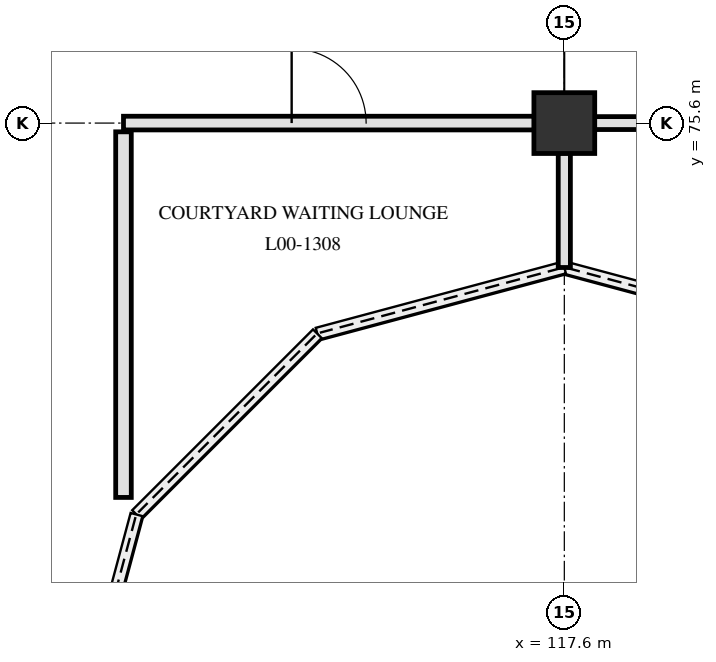
"""IFC4 building model, lengths in metres.
Left out: names, types, materials, properties, quantities, classifications, styles, units other than length and angle.
Written with IfcOpenShell. Run it as: python <this file> out.ifc"""

import sys

from ifc_helpers import new_model, si_unit, direction, frame, frame_2d, origin, origin_2d, place, context, subcontext, project, spatial, rectangle, circle, extrude, element, fill, save


model = new_model("IFC4")
c1 = context("Model", 3, precision=1e-05, world=origin(), true_north=direction((0.0, 1.0)))
c2 = subcontext(c1, "Body", "Model", "MODEL_VIEW")
j1 = project(units=[si_unit("LENGTHUNIT", "METRE"), si_unit("PLANEANGLEUNIT", "RADIAN")], contexts=[c1])
p1 = place(None, origin())
s1 = spatial("IfcSite", under=j1, at=p1, CompositionType="ELEMENT")
p2 = place(p1, origin())
s2 = spatial("IfcBuilding", under=s1, at=p2, CompositionType="ELEMENT")
p3 = place(p2, origin())
s3 = spatial("IfcBuildingStorey", under=s2, at=p3, CompositionType="ELEMENT", Elevation=0.0)
p4 = place(p3, frame((117.6, 75.6, 0.0), z_axis=(0.0, 0.0, 1.0), x_axis=(1.0, 0.0, 0.0)))
e1 = element("IfcColumn", 1, at=p4, inside=s3, PredefinedType="COLUMN", context=c2, shape_type="SweptSolid", body=[
    extrude(circle(Radius=0.4, at=origin_2d()), origin(), (0.0, 0.0, 1.0), 4.8),
])
p5 = place(p3, frame((111.8, 75.6, 0.0), z_axis=(0.0, 0.0, 1.0), x_axis=(1.0, 0.0, 0.0)))
e2 = element("IfcWall", 2, at=p5, inside=s3, PredefinedType="PARTITIONING", context=c2, shape_type="SweptSolid", body=[
    extrude(rectangle(XDim=5.405, YDim=0.18, at=frame_2d((2.703, 0.0))), origin(), (0.0, 0.0, 1.0), 3.84),
])
p6 = place(p5, frame((2.212, 0.0, 0.0)))
e3 = element("IfcOpeningElement", 3, at=p6, cuts=e2, PredefinedType="OPENING", context=c2, shape_type="SweptSolid", body=[
    extrude(rectangle(XDim=0.98, YDim=2.12, at=frame_2d((0.49, 1.06))), frame((0.0, 0.1, 0.0), z_axis=(0.0, -1.0, 0.0), x_axis=(1.0, 0.0, 0.0)), (0.0, 0.0, 1.0), 0.2),
])
p7 = place(p3, frame((117.995, 75.6, 0.0), z_axis=(0.0, 0.0, 1.0), x_axis=(1.0, 0.0, 0.0)))
e4 = element("IfcWall", 4, at=p7, inside=s3, PredefinedType="PARTITIONING", context=c2, shape_type="SweptSolid", body=[
    extrude(rectangle(XDim=7.61, YDim=0.17, at=frame_2d((3.805, 0.0))), origin(), (0.0, 0.0, 1.0), 3.84),
])
p8 = place(p7, frame((3.305, 0.0, 0.0)))
e5 = element("IfcOpeningElement", 5, at=p8, cuts=e4, PredefinedType="OPENING", context=c2, shape_type="SweptSolid", body=[
    extrude(rectangle(XDim=1.0, YDim=2.15, at=frame_2d((0.5, 1.075))), frame((0.0, 0.095, 0.0), z_axis=(0.0, -1.0, 0.0), x_axis=(1.0, 0.0, 0.0)), (0.0, 0.0, 1.0), 0.19),
])
p9 = place(p3, frame((111.8, 70.675, 0.0), z_axis=(0.0, 0.0, 1.0), x_axis=(0.0, 1.0, 0.0)))
e6 = element("IfcWall", 6, at=p9, inside=s3, PredefinedType="PARTITIONING", context=c2, shape_type="SweptSolid", body=[
    extrude(rectangle(XDim=4.81, YDim=0.205, at=frame_2d((2.405, 0.0))), origin(), (0.0, 0.0, 1.0), 3.84),
])
p10 = place(p3, frame((117.6, 73.7, 0.0), z_axis=(0.0, 0.0, 1.0), x_axis=(0.0, 1.0, 0.0)))
e7 = element("IfcWall", 7, at=p10, inside=s3, PredefinedType="PARTITIONING", context=c2, shape_type="SweptSolid", body=[
    extrude(rectangle(XDim=1.505, YDim=0.16, at=frame_2d((0.752, 0.0))), origin(), (0.0, 0.0, 1.0), 4.49),
])
p11 = place(p6, origin())
e8 = element("IfcDoor", 8, at=p11, inside=s3, OperationType="SINGLE_SWING_LEFT", PredefinedType="DOOR", context=c2, shape_type="SweptSolid", body=[
    extrude(rectangle(XDim=0.98, YDim=2.12, at=frame_2d((0.49, 1.06))), frame((0.0, 0.025, 0.0), z_axis=(0.0, -1.0, 0.0), x_axis=(1.0, 0.0, 0.0)), (0.0, 0.0, 1.0), 0.05),
])
fill(e3, e8)
save(model, sys.argv[1])
